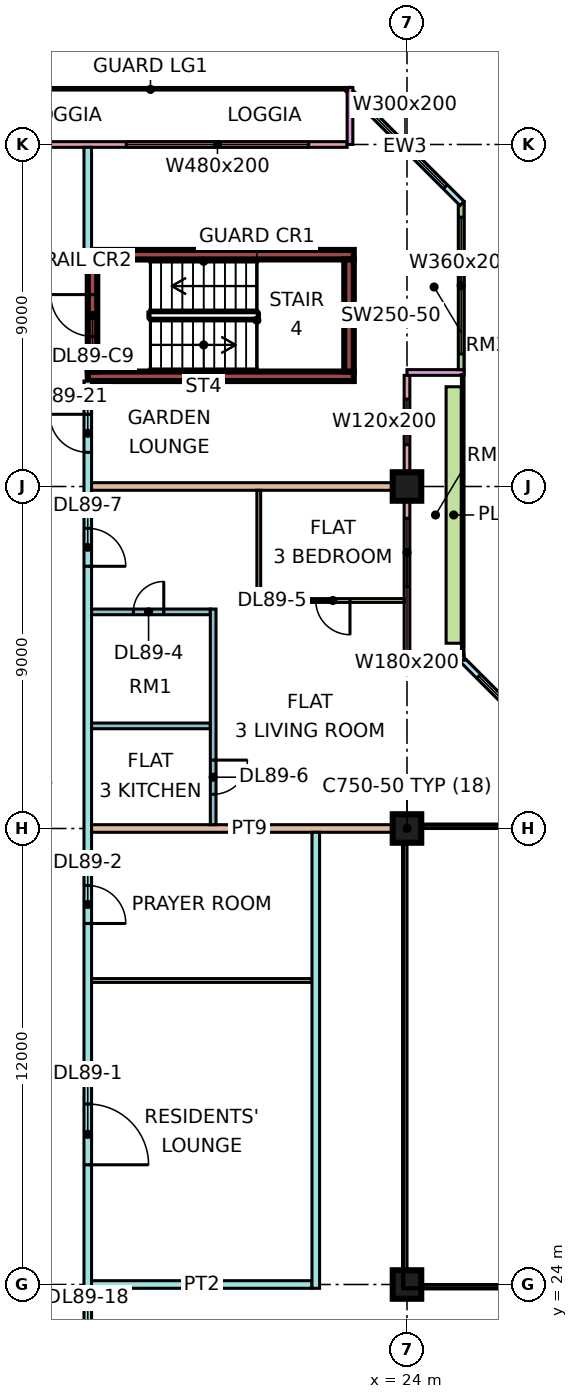
"""IFC4 building model, lengths in metres.
Left out: names, types, materials, properties, quantities, classifications, styles, units other than length and angle.
Written with IfcOpenShell. Run it as: python <this file> out.ifc"""

import sys

from ifc_helpers import new_model, si_unit, direction, frame, frame_2d, origin, origin_2d, place, context, subcontext, project, spatial, rectangle, extrude, element, fill, save


model = new_model("IFC4")
c1 = context("Model", 3, precision=1e-05, world=origin(), true_north=direction((0.0, 1.0)))
c2 = subcontext(c1, "Body", "Model", "MODEL_VIEW")
j1 = project(units=[si_unit("LENGTHUNIT", "METRE"), si_unit("PLANEANGLEUNIT", "RADIAN")], contexts=[c1])
p1 = place(None, origin())
s1 = spatial("IfcSite", under=j1, at=p1, CompositionType="ELEMENT")
p2 = place(p1, origin())
s2 = spatial("IfcBuilding", under=s1, at=p2, CompositionType="ELEMENT")
p3 = place(p2, frame((0.0, 0.0, 380.15)))
s3 = spatial("IfcBuildingStorey", under=s2, at=p3, CompositionType="ELEMENT", Elevation=380.15)
for number, where, z_axis, x_axis in (
    (1, (24.0, 24.0, 0.0), (0.0, 0.0, 1.0), (1.0, 0.0, 0.0)),
    (2, (24.0, 36.0, 0.0), (0.0, 0.0, 1.0), (1.0, 0.0, 0.0)),
    (3, (24.0, 45.0, 0.0), (0.0, 0.0, 1.0), (1.0, 0.0, 0.0)),
):
    element("IfcColumn", number, at=place(p3, frame(where, z_axis=z_axis, x_axis=x_axis)), inside=s3, PredefinedType="COLUMN", context=c2, shape_type="SweptSolid", body=[
        extrude(rectangle(XDim=0.75, YDim=0.75, at=origin_2d()), origin(), (0.0, 0.0, 1.0), 3.75),
    ])
for number, where, z_axis, x_axis in (
    (4, (15.6, 47.9, 0.0), (0.0, 0.0, 1.0), (1.0, 0.0, 0.0)),
    (5, (15.6, 51.1, 0.0), (0.0, 0.0, 1.0), (1.0, 0.0, 0.0)),
):
    element("IfcWall", number, at=place(p3, frame(where, z_axis=z_axis, x_axis=x_axis)), inside=s3, PredefinedType="SHEAR", context=c2, shape_type="SweptSolid", body=[
        extrude(rectangle(XDim=7.0, YDim=0.25, at=frame_2d((3.5, 0.0))), origin(), (0.0, 0.0, 1.0), 3.75),
    ])
p4 = place(p3, frame((15.725, 48.025, 0.0), z_axis=(0.0, 0.0, 1.0), x_axis=(0.0, 1.0, 0.0)))
e6 = element("IfcWall", 6, at=p4, inside=s3, PredefinedType="SHEAR", context=c2, shape_type="SweptSolid", body=[
    extrude(rectangle(XDim=2.95, YDim=0.25, at=frame_2d((1.475, 0.0))), origin(), (0.0, 0.0, 1.0), 3.75),
])
p5 = place(p4, frame((0.925, 0.0, 0.0)))
e7 = element("IfcOpeningElement", 7, at=p5, cuts=e6, PredefinedType="OPENING", context=c2, shape_type="SweptSolid", body=[
    extrude(rectangle(XDim=1.1, YDim=2.2, at=frame_2d((0.55, 1.1))), frame((0.0, 0.135, 0.0), z_axis=(0.0, -1.0, 0.0), x_axis=(1.0, 0.0, 0.0)), (0.0, 0.0, 1.0), 0.27),
])
p6 = place(p3, frame((22.475, 48.025, 0.0), z_axis=(0.0, 0.0, 1.0), x_axis=(0.0, 1.0, 0.0)))
e8 = element("IfcWall", 8, at=p6, inside=s3, PredefinedType="SHEAR", context=c2, shape_type="SweptSolid", body=[
    extrude(rectangle(XDim=2.95, YDim=0.25, at=frame_2d((1.475, 0.0))), origin(), (0.0, 0.0, 1.0), 3.75),
])
p7 = place(p3, frame((28.447, 37.447, 0.0), z_axis=(0.0, 0.0, 1.0), x_axis=(-0.707106781187, 0.707106781187, 0.0)))
e9 = element("IfcWall", 9, at=p7, inside=s3, PredefinedType="SOLIDWALL", context=c2, shape_type="SweptSolid", body=[
    extrude(rectangle(XDim=4.243, YDim=0.15, at=frame_2d((2.121, 0.0))), origin(), (0.0, 0.0, 1.0), 3.3),
])
p8 = place(p7, frame((0.621, 0.0, 0.45)))
e10 = element("IfcOpeningElement", 10, at=p8, cuts=e9, PredefinedType="OPENING", context=c2, shape_type="SweptSolid", body=[
    extrude(rectangle(XDim=3.0, YDim=2.0, at=frame_2d((1.5, 1.0))), frame((0.0, 0.085, 0.0), z_axis=(0.0, -1.0, 0.0), x_axis=(1.0, 0.0, 0.0)), (0.0, 0.0, 1.0), 0.17),
])
p9 = place(p3, frame((24.0, 40.575, 0.0), z_axis=(0.0, 0.0, 1.0), x_axis=(0.0, 1.0, 0.0)))
e11 = element("IfcWall", 11, at=p9, inside=s3, PredefinedType="SOLIDWALL", context=c2, shape_type="SweptSolid", body=[
    extrude(rectangle(XDim=7.35, YDim=0.15, at=frame_2d((3.675, 0.0))), origin(), (0.0, 0.0, 1.0), 3.3),
])
p10 = place(p9, frame((1.788, 0.0, 0.45)))
e12 = element("IfcOpeningElement", 12, at=p10, cuts=e11, PredefinedType="OPENING", context=c2, shape_type="SweptSolid", body=[
    extrude(rectangle(XDim=1.8, YDim=2.0, at=frame_2d((0.9, 1.0))), frame((0.0, 0.085, 0.0), z_axis=(0.0, -1.0, 0.0), x_axis=(1.0, 0.0, 0.0)), (0.0, 0.0, 1.0), 0.17),
])
p11 = place(p9, frame((5.525, 0.0, 0.45)))
e13 = element("IfcOpeningElement", 13, at=p11, cuts=e11, PredefinedType="OPENING", context=c2, shape_type="SweptSolid", body=[
    extrude(rectangle(XDim=1.2, YDim=2.0, at=frame_2d((0.6, 1.0))), frame((0.0, 0.085, 0.0), z_axis=(0.0, -1.0, 0.0), x_axis=(1.0, 0.0, 0.0)), (0.0, 0.0, 1.0), 0.17),
])
for number, where, z_axis, x_axis in (
    (14, (25.5, 40.5, 0.0), (0.0, 0.0, 1.0), (-1.0, 0.0, 0.0)),
    (15, (25.5, 48.0, 0.0), (0.0, 0.0, 1.0), (-1.0, 0.0, 0.0)),
):
    element("IfcWall", number, at=place(p3, frame(where, z_axis=z_axis, x_axis=x_axis)), inside=s3, PredefinedType="SOLIDWALL", context=c2, shape_type="SweptSolid", body=[
        extrude(rectangle(XDim=1.5, YDim=0.15, at=frame_2d((0.75, 0.0))), origin(), (0.0, 0.0, 1.0), 3.3),
    ])
p12 = place(p3, frame((25.425, 48.075, 0.0), z_axis=(0.0, 0.0, 1.0), x_axis=(0.0, 1.0, 0.0)))
e16 = element("IfcWall", 16, at=p12, inside=s3, PredefinedType="SOLIDWALL", context=c2, shape_type="SweptSolid", body=[
    extrude(rectangle(XDim=4.425, YDim=0.15, at=frame_2d((2.212, 0.0))), origin(), (0.0, 0.0, 1.0), 3.3),
])
p13 = place(p12, frame((0.413, 0.0, 0.45)))
e17 = element("IfcOpeningElement", 17, at=p13, cuts=e16, PredefinedType="OPENING", context=c2, shape_type="SweptSolid", body=[
    extrude(rectangle(XDim=3.6, YDim=2.0, at=frame_2d((1.8, 1.0))), frame((0.0, 0.085, 0.0), z_axis=(0.0, -1.0, 0.0), x_axis=(1.0, 0.0, 0.0)), (0.0, 0.0, 1.0), 0.17),
])
p14 = place(p3, frame((25.447, 52.447, 0.0), z_axis=(0.0, 0.0, 1.0), x_axis=(-0.707106781187, 0.707106781187, 0.0)))
e18 = element("IfcWall", 18, at=p14, inside=s3, PredefinedType="SOLIDWALL", context=c2, shape_type="SweptSolid", body=[
    extrude(rectangle(XDim=4.243, YDim=0.15, at=frame_2d((2.121, 0.0))), origin(), (0.0, 0.0, 1.0), 3.3),
])
p15 = place(p14, frame((0.621, 0.0, 0.45)))
e19 = element("IfcOpeningElement", 19, at=p15, cuts=e18, PredefinedType="OPENING", context=c2, shape_type="SweptSolid", body=[
    extrude(rectangle(XDim=3.0, YDim=2.0, at=frame_2d((1.5, 1.0))), frame((0.0, 0.085, 0.0), z_axis=(0.0, -1.0, 0.0), x_axis=(1.0, 0.0, 0.0)), (0.0, 0.0, 1.0), 0.17),
])
p16 = place(p3, frame((22.425, 54.0, 0.0), z_axis=(0.0, 0.0, 1.0), x_axis=(-1.0, 0.0, 0.0)))
e20 = element("IfcWall", 20, at=p16, inside=s3, PredefinedType="SOLIDWALL", context=c2, shape_type="SweptSolid", body=[
    extrude(rectangle(XDim=10.35, YDim=0.15, at=frame_2d((5.175, 0.0))), origin(), (0.0, 0.0, 1.0), 3.3),
])
p17 = place(p16, frame((1.012, 0.0, 0.45)))
e21 = element("IfcOpeningElement", 21, at=p17, cuts=e20, PredefinedType="OPENING", context=c2, shape_type="SweptSolid", body=[
    extrude(rectangle(XDim=4.8, YDim=2.0, at=frame_2d((2.4, 1.0))), frame((0.0, 0.085, 0.0), z_axis=(0.0, -1.0, 0.0), x_axis=(1.0, 0.0, 0.0)), (0.0, 0.0, 1.0), 0.17),
])
p18 = place(p3, frame((22.5, 55.5, 0.0), z_axis=(0.0, 0.0, 1.0), x_axis=(0.0, -1.0, 0.0)))
e22 = element("IfcWall", 22, at=p18, inside=s3, PredefinedType="SOLIDWALL", context=c2, shape_type="SweptSolid", body=[
    extrude(rectangle(XDim=1.5, YDim=0.15, at=frame_2d((0.75, 0.0))), origin(), (0.0, 0.0, 1.0), 3.3),
])
p19 = place(p3, frame((25.229, 40.875, 0.0), z_axis=(0.0, 0.0, 1.0), x_axis=(0.0, 1.0, 0.0)))
e23 = element("IfcWall", 23, at=p19, inside=s3, PredefinedType="SOLIDWALL", context=c2, shape_type="SweptSolid", body=[
    extrude(rectangle(XDim=6.75, YDim=0.4, at=frame_2d((3.375, 0.0))), origin(), (0.0, 0.0, 1.0), 0.7),
])
p20 = place(p3, frame((15.6, 20.0, 0.0), z_axis=(0.0, 0.0, 1.0), x_axis=(0.0, 1.0, 0.0)))
e24 = element("IfcWall", 24, at=p20, inside=s3, PredefinedType="PARTITIONING", context=c2, shape_type="SweptSolid", body=[
    extrude(rectangle(XDim=27.775, YDim=0.2, at=frame_2d((13.887, 0.0))), origin(), (0.0, 0.0, 1.0), 3.3),
])
p21 = place(p20, frame((7.15, 0.0, 0.0)))
e25 = element("IfcOpeningElement", 25, at=p21, cuts=e24, PredefinedType="OPENING", context=c2, shape_type="SweptSolid", body=[
    extrude(rectangle(XDim=1.6, YDim=2.1, at=frame_2d((0.8, 1.05))), frame((0.0, 0.11, 0.0), z_axis=(0.0, -1.0, 0.0), x_axis=(1.0, 0.0, 0.0)), (0.0, 0.0, 1.0), 0.22),
])
p22 = place(p20, frame((13.5, 0.0, 0.0)))
e26 = element("IfcOpeningElement", 26, at=p22, cuts=e24, PredefinedType="OPENING", context=c2, shape_type="SweptSolid", body=[
    extrude(rectangle(XDim=1.0, YDim=2.1, at=frame_2d((0.5, 1.05))), frame((0.0, 0.11, 0.0), z_axis=(0.0, -1.0, 0.0), x_axis=(1.0, 0.0, 0.0)), (0.0, 0.0, 1.0), 0.22),
])
p23 = place(p20, frame((22.9, 0.0, 0.0)))
e27 = element("IfcOpeningElement", 27, at=p23, cuts=e24, PredefinedType="OPENING", context=c2, shape_type="SweptSolid", body=[
    extrude(rectangle(XDim=1.0, YDim=2.1, at=frame_2d((0.5, 1.05))), frame((0.0, 0.11, 0.0), z_axis=(0.0, -1.0, 0.0), x_axis=(1.0, 0.0, 0.0)), (0.0, 0.0, 1.0), 0.22),
])
p24 = place(p20, frame((1.15, 0.0, 0.0)))
e28 = element("IfcOpeningElement", 28, at=p24, cuts=e24, PredefinedType="OPENING", context=c2, shape_type="SweptSolid", body=[
    extrude(rectangle(XDim=1.8, YDim=2.1, at=frame_2d((0.9, 1.05))), frame((0.0, 0.11, 0.0), z_axis=(0.0, -1.0, 0.0), x_axis=(1.0, 0.0, 0.0)), (0.0, 0.0, 1.0), 0.22),
])
p25 = place(p20, frame((25.9, 0.0, 0.0)))
e29 = element("IfcOpeningElement", 29, at=p25, cuts=e24, PredefinedType="OPENING", context=c2, shape_type="SweptSolid", body=[
    extrude(rectangle(XDim=1.0, YDim=2.1, at=frame_2d((0.5, 1.05))), frame((0.0, 0.11, 0.0), z_axis=(0.0, -1.0, 0.0), x_axis=(1.0, 0.0, 0.0)), (0.0, 0.0, 1.0), 0.22),
])
p26 = place(p3, frame((15.6, 51.225, 0.0), z_axis=(0.0, 0.0, 1.0), x_axis=(0.0, 1.0, 0.0)))
e30 = element("IfcWall", 30, at=p26, inside=s3, PredefinedType="PARTITIONING", context=c2, shape_type="SweptSolid", body=[
    extrude(rectangle(XDim=2.701, YDim=0.2, at=frame_2d((1.351, 0.0))), origin(), (0.0, 0.0, 1.0), 3.3),
])
p27 = place(p3, frame((15.7, 24.0, 0.0), z_axis=(0.0, 0.0, 1.0), x_axis=(1.0, 0.0, 0.0)))
e31 = element("IfcWall", 31, at=p27, inside=s3, PredefinedType="PARTITIONING", context=c2, shape_type="SweptSolid", body=[
    extrude(rectangle(XDim=5.8, YDim=0.2, at=frame_2d((2.9, 0.0))), origin(), (0.0, 0.0, 1.0), 3.3),
])
p28 = place(p3, frame((15.7, 32.0, 0.0), z_axis=(0.0, 0.0, 1.0), x_axis=(1.0, 0.0, 0.0)))
e32 = element("IfcWall", 32, at=p28, inside=s3, PredefinedType="PARTITIONING", context=c2, shape_type="SweptSolid", body=[
    extrude(rectangle(XDim=5.8, YDim=0.1, at=frame_2d((2.9, 0.0))), origin(), (0.0, 0.0, 1.0), 3.3),
])
p29 = place(p3, frame((15.7, 36.0, 0.0), z_axis=(0.0, 0.0, 1.0), x_axis=(1.0, 0.0, 0.0)))
e33 = element("IfcWall", 33, at=p29, inside=s3, PredefinedType="PARTITIONING", context=c2, shape_type="SweptSolid", body=[
    extrude(rectangle(XDim=8.3, YDim=0.2, at=frame_2d((4.15, 0.0))), origin(), (0.0, 0.0, 1.0), 3.3),
])
p30 = place(p3, frame((15.7, 38.7, 0.0), z_axis=(0.0, 0.0, 1.0), x_axis=(1.0, 0.0, 0.0)))
e34 = element("IfcWall", 34, at=p30, inside=s3, PredefinedType="PARTITIONING", context=c2, shape_type="SweptSolid", body=[
    extrude(rectangle(XDim=3.125, YDim=0.15, at=frame_2d((1.562, 0.0))), origin(), (0.0, 0.0, 1.0), 3.3),
])
p31 = place(p3, frame((15.7, 41.7, 0.0), z_axis=(0.0, 0.0, 1.0), x_axis=(1.0, 0.0, 0.0)))
e35 = element("IfcWall", 35, at=p31, inside=s3, PredefinedType="PARTITIONING", context=c2, shape_type="SweptSolid", body=[
    extrude(rectangle(XDim=3.125, YDim=0.15, at=frame_2d((1.562, 0.0))), origin(), (0.0, 0.0, 1.0), 3.3),
])
p32 = place(p31, frame((1.1, 0.0, 0.0)))
e36 = element("IfcOpeningElement", 36, at=p32, cuts=e35, PredefinedType="OPENING", context=c2, shape_type="SweptSolid", body=[
    extrude(rectangle(XDim=0.8, YDim=2.1, at=frame_2d((0.4, 1.05))), frame((0.0, 0.085, 0.0), z_axis=(0.0, -1.0, 0.0), x_axis=(1.0, 0.0, 0.0)), (0.0, 0.0, 1.0), 0.17),
])
p33 = place(p3, frame((15.7, 45.0, 0.0), z_axis=(0.0, 0.0, 1.0), x_axis=(1.0, 0.0, 0.0)))
e37 = element("IfcWall", 37, at=p33, inside=s3, PredefinedType="PARTITIONING", context=c2, shape_type="SweptSolid", body=[
    extrude(rectangle(XDim=8.226, YDim=0.2, at=frame_2d((4.113, 0.0))), origin(), (0.0, 0.0, 1.0), 3.3),
])
p34 = place(p3, frame((18.9, 36.1, 0.0), z_axis=(0.0, 0.0, 1.0), x_axis=(0.0, 1.0, 0.0)))
e38 = element("IfcWall", 38, at=p34, inside=s3, PredefinedType="PARTITIONING", context=c2, shape_type="SweptSolid", body=[
    extrude(rectangle(XDim=5.675, YDim=0.15, at=frame_2d((2.837, 0.0))), origin(), (0.0, 0.0, 1.0), 3.3),
])
p35 = place(p34, frame((0.8, 0.0, 0.0)))
e39 = element("IfcOpeningElement", 39, at=p35, cuts=e38, PredefinedType="OPENING", context=c2, shape_type="SweptSolid", body=[
    extrude(rectangle(XDim=0.9, YDim=2.1, at=frame_2d((0.45, 1.05))), frame((0.0, 0.085, 0.0), z_axis=(0.0, -1.0, 0.0), x_axis=(1.0, 0.0, 0.0)), (0.0, 0.0, 1.0), 0.17),
])
p36 = place(p3, frame((20.05, 42.0, 0.0), z_axis=(0.0, 0.0, 1.0), x_axis=(1.0, 0.0, 0.0)))
e40 = element("IfcWall", 40, at=p36, inside=s3, PredefinedType="PARTITIONING", context=c2, shape_type="SweptSolid", body=[
    extrude(rectangle(XDim=3.876, YDim=0.1, at=frame_2d((1.938, 0.0))), origin(), (0.0, 0.0, 1.0), 3.3),
])
p37 = place(p36, frame((1.55, 0.0, 0.0)))
e41 = element("IfcOpeningElement", 41, at=p37, cuts=e40, PredefinedType="OPENING", context=c2, shape_type="SweptSolid", body=[
    extrude(rectangle(XDim=0.9, YDim=2.1, at=frame_2d((0.45, 1.05))), frame((0.0, 0.06, 0.0), z_axis=(0.0, -1.0, 0.0), x_axis=(1.0, 0.0, 0.0)), (0.0, 0.0, 1.0), 0.12),
])
p38 = place(p3, frame((20.1, 42.05, 0.0), z_axis=(0.0, 0.0, 1.0), x_axis=(0.0, 1.0, 0.0)))
e42 = element("IfcWall", 42, at=p38, inside=s3, PredefinedType="PARTITIONING", context=c2, shape_type="SweptSolid", body=[
    extrude(rectangle(XDim=2.85, YDim=0.1, at=frame_2d((1.425, 0.0))), origin(), (0.0, 0.0, 1.0), 3.3),
])
p39 = place(p3, frame((21.6, 23.9, 0.0), z_axis=(0.0, 0.0, 1.0), x_axis=(0.0, 1.0, 0.0)))
e43 = element("IfcWall", 43, at=p39, inside=s3, PredefinedType="PARTITIONING", context=c2, shape_type="SweptSolid", body=[
    extrude(rectangle(XDim=12.0, YDim=0.2, at=frame_2d((6.0, 0.0))), origin(), (0.0, 0.0, 1.0), 3.3),
])
p40 = place(p8, origin())
e44 = element("IfcWindow", 44, at=p40, inside=s3, PartitioningType="SINGLE_PANEL", PredefinedType="WINDOW", context=c2, shape_type="SweptSolid", body=[
    extrude(rectangle(XDim=3.0, YDim=2.0, at=frame_2d((1.5, 1.0))), frame((0.0, 0.03, 0.0), z_axis=(0.0, -1.0, 0.0), x_axis=(1.0, 0.0, 0.0)), (0.0, 0.0, 1.0), 0.06),
])
fill(e10, e44)
p41 = place(p10, origin())
e45 = element("IfcWindow", 45, at=p41, inside=s3, PartitioningType="SINGLE_PANEL", PredefinedType="WINDOW", context=c2, shape_type="SweptSolid", body=[
    extrude(rectangle(XDim=1.8, YDim=2.0, at=frame_2d((0.9, 1.0))), frame((0.0, 0.03, 0.0), z_axis=(0.0, -1.0, 0.0), x_axis=(1.0, 0.0, 0.0)), (0.0, 0.0, 1.0), 0.06),
])
fill(e12, e45)
p42 = place(p11, origin())
e46 = element("IfcWindow", 46, at=p42, inside=s3, PartitioningType="SINGLE_PANEL", PredefinedType="WINDOW", context=c2, shape_type="SweptSolid", body=[
    extrude(rectangle(XDim=1.2, YDim=2.0, at=frame_2d((0.6, 1.0))), frame((0.0, 0.03, 0.0), z_axis=(0.0, -1.0, 0.0), x_axis=(1.0, 0.0, 0.0)), (0.0, 0.0, 1.0), 0.06),
])
fill(e13, e46)
p43 = place(p13, origin())
e47 = element("IfcWindow", 47, at=p43, inside=s3, PartitioningType="SINGLE_PANEL", PredefinedType="WINDOW", context=c2, shape_type="SweptSolid", body=[
    extrude(rectangle(XDim=3.6, YDim=2.0, at=frame_2d((1.8, 1.0))), frame((0.0, 0.03, 0.0), z_axis=(0.0, -1.0, 0.0), x_axis=(1.0, 0.0, 0.0)), (0.0, 0.0, 1.0), 0.06),
])
fill(e17, e47)
p44 = place(p15, origin())
e48 = element("IfcWindow", 48, at=p44, inside=s3, PartitioningType="SINGLE_PANEL", PredefinedType="WINDOW", context=c2, shape_type="SweptSolid", body=[
    extrude(rectangle(XDim=3.0, YDim=2.0, at=frame_2d((1.5, 1.0))), frame((0.0, 0.03, 0.0), z_axis=(0.0, -1.0, 0.0), x_axis=(1.0, 0.0, 0.0)), (0.0, 0.0, 1.0), 0.06),
])
fill(e19, e48)
p45 = place(p17, origin())
e49 = element("IfcWindow", 49, at=p45, inside=s3, PartitioningType="SINGLE_PANEL", PredefinedType="WINDOW", context=c2, shape_type="SweptSolid", body=[
    extrude(rectangle(XDim=4.8, YDim=2.0, at=frame_2d((2.4, 1.0))), frame((0.0, 0.03, 0.0), z_axis=(0.0, -1.0, 0.0), x_axis=(1.0, 0.0, 0.0)), (0.0, 0.0, 1.0), 0.06),
])
fill(e21, e49)
p46 = place(p5, frame((1.1, 0.0, 0.0), z_axis=(0.0, 0.0, 1.0), x_axis=(-1.0, 0.0, 0.0)))
e50 = element("IfcDoor", 50, at=p46, inside=s3, OperationType="SINGLE_SWING_RIGHT", PredefinedType="DOOR", context=c2, shape_type="SweptSolid", body=[
    extrude(rectangle(XDim=1.1, YDim=2.2, at=frame_2d((0.55, 1.1))), frame((0.0, 0.025, 0.0), z_axis=(0.0, -1.0, 0.0), x_axis=(1.0, 0.0, 0.0)), (0.0, 0.0, 1.0), 0.05),
])
fill(e7, e50)
p47 = place(p21, frame((1.6, 0.0, 0.0), z_axis=(0.0, 0.0, 1.0), x_axis=(-1.0, 0.0, 0.0)))
e51 = element("IfcDoor", 51, at=p47, inside=s3, OperationType="DOUBLE_DOOR_SINGLE_SWING", PredefinedType="DOOR", context=c2, shape_type="SweptSolid", body=[
    extrude(rectangle(XDim=1.6, YDim=2.1, at=frame_2d((0.8, 1.05))), frame((0.0, 0.025, 0.0), z_axis=(0.0, -1.0, 0.0), x_axis=(1.0, 0.0, 0.0)), (0.0, 0.0, 1.0), 0.05),
])
fill(e25, e51)
p48 = place(p22, frame((1.0, 0.0, 0.0), z_axis=(0.0, 0.0, 1.0), x_axis=(-1.0, 0.0, 0.0)))
e52 = element("IfcDoor", 52, at=p48, inside=s3, OperationType="SINGLE_SWING_LEFT", PredefinedType="DOOR", context=c2, shape_type="SweptSolid", body=[
    extrude(rectangle(XDim=1.0, YDim=2.1, at=frame_2d((0.5, 1.05))), frame((0.0, 0.025, 0.0), z_axis=(0.0, -1.0, 0.0), x_axis=(1.0, 0.0, 0.0)), (0.0, 0.0, 1.0), 0.05),
])
fill(e26, e52)
p49 = place(p32, frame((0.8, 0.0, 0.0), z_axis=(0.0, 0.0, 1.0), x_axis=(-1.0, 0.0, 0.0)))
e53 = element("IfcDoor", 53, at=p49, inside=s3, OperationType="SINGLE_SWING_RIGHT", PredefinedType="DOOR", context=c2, shape_type="SweptSolid", body=[
    extrude(rectangle(XDim=0.8, YDim=2.1, at=frame_2d((0.4, 1.05))), frame((0.0, 0.025, 0.0), z_axis=(0.0, -1.0, 0.0), x_axis=(1.0, 0.0, 0.0)), (0.0, 0.0, 1.0), 0.05),
])
fill(e36, e53)
p50 = place(p37, origin())
e54 = element("IfcDoor", 54, at=p50, inside=s3, OperationType="SINGLE_SWING_RIGHT", PredefinedType="DOOR", context=c2, shape_type="SweptSolid", body=[
    extrude(rectangle(XDim=0.9, YDim=2.1, at=frame_2d((0.45, 1.05))), frame((0.0, 0.025, 0.0), z_axis=(0.0, -1.0, 0.0), x_axis=(1.0, 0.0, 0.0)), (0.0, 0.0, 1.0), 0.05),
])
fill(e41, e54)
p51 = place(p35, origin())
e55 = element("IfcDoor", 55, at=p51, inside=s3, OperationType="SINGLE_SWING_RIGHT", PredefinedType="DOOR", context=c2, shape_type="SweptSolid", body=[
    extrude(rectangle(XDim=0.9, YDim=2.1, at=frame_2d((0.45, 1.05))), frame((0.0, 0.025, 0.0), z_axis=(0.0, -1.0, 0.0), x_axis=(1.0, 0.0, 0.0)), (0.0, 0.0, 1.0), 0.05),
])
fill(e39, e55)
p52 = place(p23, frame((1.0, 0.0, 0.0), z_axis=(0.0, 0.0, 1.0), x_axis=(-1.0, 0.0, 0.0)))
e56 = element("IfcDoor", 56, at=p52, inside=s3, OperationType="SINGLE_SWING_LEFT", PredefinedType="DOOR", context=c2, shape_type="SweptSolid", body=[
    extrude(rectangle(XDim=1.0, YDim=2.1, at=frame_2d((0.5, 1.05))), frame((0.0, 0.025, 0.0), z_axis=(0.0, -1.0, 0.0), x_axis=(1.0, 0.0, 0.0)), (0.0, 0.0, 1.0), 0.05),
])
fill(e27, e56)
p53 = place(p25, frame((1.0, 0.0, 0.0), z_axis=(0.0, 0.0, 1.0), x_axis=(-1.0, 0.0, 0.0)))
e57 = element("IfcDoor", 57, at=p53, inside=s3, OperationType="SINGLE_SWING_RIGHT", PredefinedType="DOOR", context=c2, shape_type="SweptSolid", body=[
    extrude(rectangle(XDim=1.0, YDim=2.1, at=frame_2d((0.5, 1.05))), frame((0.0, 0.025, 0.0), z_axis=(0.0, -1.0, 0.0), x_axis=(1.0, 0.0, 0.0)), (0.0, 0.0, 1.0), 0.05),
])
fill(e29, e57)
save(model, sys.argv[1])
